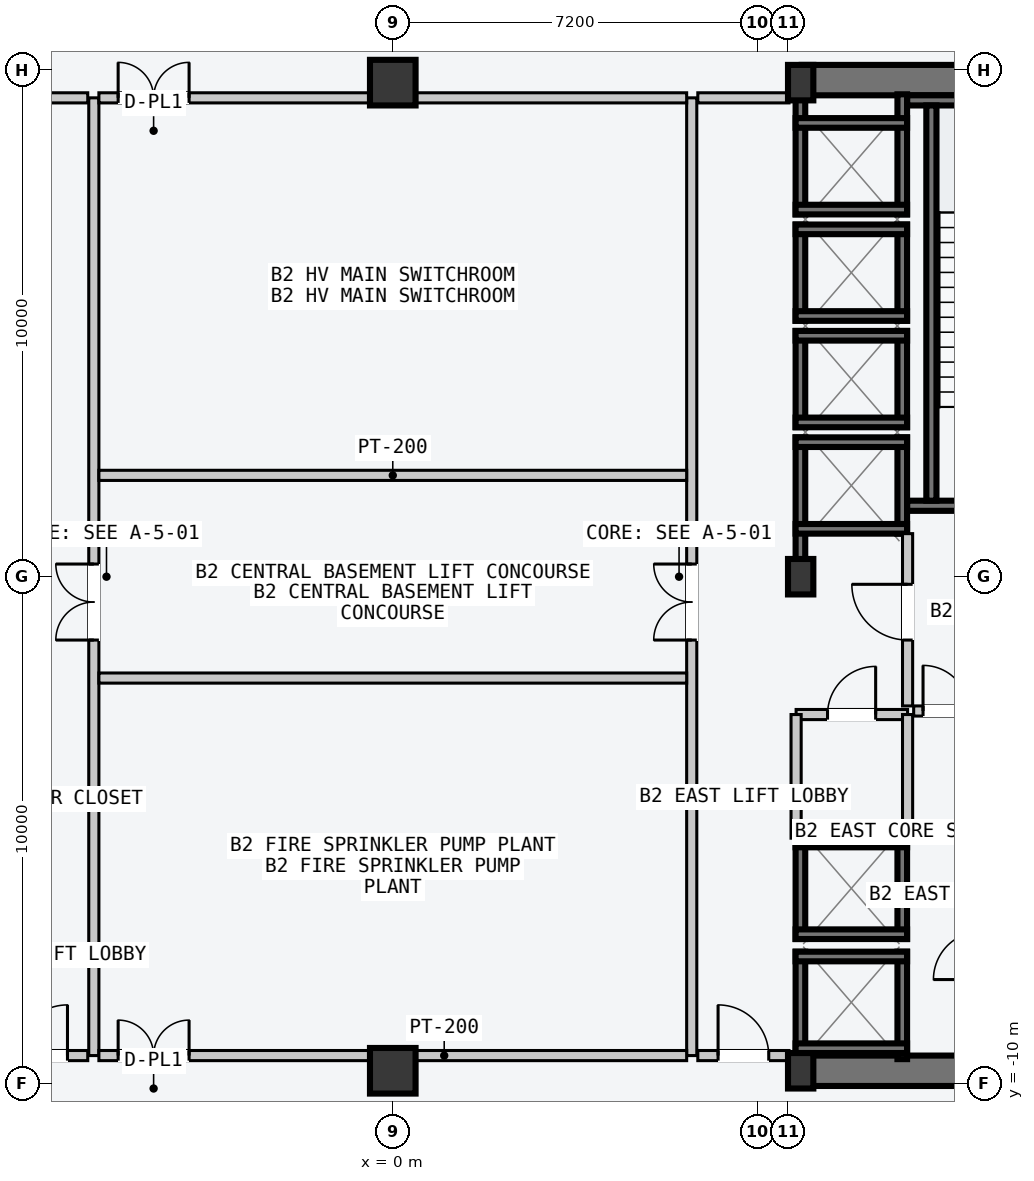
"""IFC4 building model, lengths in metres.
Left out: names, types, materials, properties, quantities, classifications, styles, units other than length and angle.
Written with IfcOpenShell. Run it as: python <this file> out.ifc"""

import sys

from ifc_helpers import new_model, si_unit, direction, frame, frame_2d, origin, origin_2d, place, context, subcontext, project, spatial, rectangle, hollow_rectangle, i_section, extrude, element, fill, save


model = new_model("IFC4")
c1 = context("Model", 3, precision=1e-05, world=origin(), true_north=direction((0.0, 1.0)))
c2 = subcontext(c1, "Body", "Model", "MODEL_VIEW")
j1 = project(units=[si_unit("LENGTHUNIT", "METRE"), si_unit("PLANEANGLEUNIT", "RADIAN")], contexts=[c1])
p1 = place(None, origin())
s1 = spatial("IfcSite", under=j1, at=p1, CompositionType="ELEMENT")
p2 = place(p1, origin())
s2 = spatial("IfcBuilding", under=s1, at=p2, CompositionType="ELEMENT")
p3 = place(p2, frame((0.0, 0.0, -9.6)))
s3 = spatial("IfcBuildingStorey", under=s2, at=p3, CompositionType="ELEMENT", Elevation=-9.6)
for number, where, z_axis, x_axis in (
    (1, (8.07, -9.75, 0.0), (0.0, 0.0, 1.0), (1.0, 0.0, 0.0)),
    (2, (8.07, 9.8, 0.0), (0.0, 0.0, 1.0), (1.0, 0.0, 0.0)),
):
    element("IfcWall", number, at=place(p3, frame(where, z_axis=z_axis, x_axis=x_axis)), inside=s3, PredefinedType="SHEAR", context=c2, shape_type="SweptSolid", body=[
        extrude(rectangle(XDim=6.46, YDim=0.6, at=frame_2d((3.23, 0.0))), origin(), (0.0, 0.0, 1.0), 4.58),
    ])
p4 = place(p3, frame((10.15, 1.4, 0.0), z_axis=(0.0, 0.0, 1.0), x_axis=(1.0, 0.0, 0.0)))
e3 = element("IfcWall", 3, at=p4, inside=s3, PredefinedType="SOLIDWALL", context=c2, shape_type="SweptSolid", body=[
    extrude(rectangle(XDim=4.1, YDim=0.2, at=frame_2d((2.05, 0.0))), origin(), (0.0, 0.0, 1.0), 4.58),
])
p5 = place(p4, frame((1.5, 0.0, 0.0)))
e4 = element("IfcOpeningElement", 4, at=p5, cuts=e3, PredefinedType="OPENING", context=c2, shape_type="SweptSolid", body=[
    extrude(rectangle(XDim=1.12, YDim=2.18, at=frame_2d((0.56, 1.09))), frame((0.0, 0.11, 0.0), z_axis=(0.0, -1.0, 0.0), x_axis=(1.0, 0.0, 0.0)), (0.0, 0.0, 1.0), 0.22),
])
p6 = place(p3, frame((10.15, 9.4, 0.0), z_axis=(0.0, 0.0, 1.0), x_axis=(1.0, 0.0, 0.0)))
e5 = element("IfcWall", 5, at=p6, inside=s3, PredefinedType="SOLIDWALL", context=c2, shape_type="SweptSolid", body=[
    extrude(rectangle(XDim=4.1, YDim=0.2, at=frame_2d((2.05, 0.0))), origin(), (0.0, 0.0, 1.0), 4.58),
])
p7 = place(p3, frame((10.63, 1.5, 0.0), z_axis=(0.0, 0.0, 1.0), x_axis=(0.0, 1.0, 0.0)))
e6 = element("IfcWall", 6, at=p7, inside=s3, PredefinedType="SOLIDWALL", context=c2, shape_type="SweptSolid", body=[
    extrude(rectangle(XDim=7.8, YDim=0.2, at=frame_2d((3.9, 0.0))), origin(), (0.0, 0.0, 1.0), 4.58),
])
for number, where, z_axis, x_axis in (
    (7, (8.05, -9.75, 0.0), (0.0, 0.0, 1.0), (1.0, 0.0, 0.0)),
    (8, (8.05, 0.0, 0.0), (0.0, 0.0, 1.0), (1.0, 0.0, 0.0)),
    (9, (8.05, 9.75, 0.0), (0.0, 0.0, 1.0), (1.0, 0.0, 0.0)),
):
    element("IfcColumn", number, at=place(p3, frame(where, z_axis=z_axis, x_axis=x_axis)), inside=s3, PredefinedType="COLUMN", context=c2, shape_type="SweptSolid", body=[
        extrude(i_section(OverallWidth=0.5, OverallDepth=0.7, WebThickness=0.028, FlangeThickness=0.045, at=origin_2d()), origin(), (0.0, 0.0, 1.0), 4.8),
    ])
for number, where, z_axis, x_axis in (
    (10, (0.0, -9.75, 0.0), (0.0, 0.0, 1.0), (1.0, 0.0, 0.0)),
    (11, (0.0, 9.75, 0.0), (0.0, 0.0, 1.0), (1.0, 0.0, 0.0)),
):
    element("IfcColumn", number, at=place(p3, frame(where, z_axis=z_axis, x_axis=x_axis)), inside=s3, PredefinedType="COLUMN", context=c2, shape_type="SweptSolid", body=[
        extrude(hollow_rectangle(XDim=0.9, YDim=0.9, WallThickness=0.045, at=origin_2d()), origin(), (0.0, 0.0, 1.0), 4.8),
    ])
p8 = place(p3, frame((8.045, 0.21, 0.0), z_axis=(0.0, 0.0, 1.0), x_axis=(0.0, 1.0, 0.0)))
e12 = element("IfcWall", 12, at=p8, inside=s3, PredefinedType="SOLIDWALL", context=c2, shape_type="SweptSolid", body=[
    extrude(rectangle(XDim=2.54, YDim=0.19, at=frame_2d((1.27, 0.0))), origin(), (0.0, 0.0, 1.0), 4.58),
])
p9 = place(p3, frame((10.055, 0.85, 0.0), z_axis=(0.0, 0.0, 1.0), x_axis=(0.0, 1.0, 0.0)))
e13 = element("IfcWall", 13, at=p9, inside=s3, PredefinedType="SOLIDWALL", context=c2, shape_type="SweptSolid", body=[
    extrude(rectangle(XDim=1.9, YDim=0.19, at=frame_2d((0.95, 0.0))), origin(), (0.0, 0.0, 1.0), 4.58),
])
for number, where, z_axis, x_axis in (
    (14, (7.95, 2.655, 0.0), (0.0, 0.0, 1.0), (1.0, 0.0, 0.0)),
    (15, (7.95, 0.945, 0.0), (0.0, 0.0, 1.0), (1.0, 0.0, 0.0)),
):
    element("IfcWall", number, at=place(p3, frame(where, z_axis=z_axis, x_axis=x_axis)), inside=s3, PredefinedType="SOLIDWALL", context=c2, shape_type="SweptSolid", body=[
        extrude(rectangle(XDim=2.2, YDim=0.19, at=frame_2d((1.1, 0.0))), origin(), (0.0, 0.0, 1.0), 4.58),
    ])
for number, where, z_axis, x_axis in (
    (16, (8.045, 2.95, 0.0), (0.0, 0.0, 1.0), (0.0, 1.0, 0.0)),
    (17, (10.055, 2.95, 0.0), (0.0, 0.0, 1.0), (0.0, 1.0, 0.0)),
):
    element("IfcWall", number, at=place(p3, frame(where, z_axis=z_axis, x_axis=x_axis)), inside=s3, PredefinedType="SOLIDWALL", context=c2, shape_type="SweptSolid", body=[
        extrude(rectangle(XDim=1.9, YDim=0.19, at=frame_2d((0.95, 0.0))), origin(), (0.0, 0.0, 1.0), 4.58),
    ])
for number, where, z_axis, x_axis in (
    (18, (7.95, 4.755, 0.0), (0.0, 0.0, 1.0), (1.0, 0.0, 0.0)),
    (19, (7.95, 3.045, 0.0), (0.0, 0.0, 1.0), (1.0, 0.0, 0.0)),
):
    element("IfcWall", number, at=place(p3, frame(where, z_axis=z_axis, x_axis=x_axis)), inside=s3, PredefinedType="SOLIDWALL", context=c2, shape_type="SweptSolid", body=[
        extrude(rectangle(XDim=2.2, YDim=0.19, at=frame_2d((1.1, 0.0))), origin(), (0.0, 0.0, 1.0), 4.58),
    ])
for number, where, z_axis, x_axis in (
    (20, (8.045, 5.05, 0.0), (0.0, 0.0, 1.0), (0.0, 1.0, 0.0)),
    (21, (10.055, 5.05, 0.0), (0.0, 0.0, 1.0), (0.0, 1.0, 0.0)),
):
    element("IfcWall", number, at=place(p3, frame(where, z_axis=z_axis, x_axis=x_axis)), inside=s3, PredefinedType="SOLIDWALL", context=c2, shape_type="SweptSolid", body=[
        extrude(rectangle(XDim=1.9, YDim=0.19, at=frame_2d((0.95, 0.0))), origin(), (0.0, 0.0, 1.0), 4.58),
    ])
for number, where, z_axis, x_axis in (
    (22, (7.95, 6.855, 0.0), (0.0, 0.0, 1.0), (1.0, 0.0, 0.0)),
    (23, (7.95, 5.145, 0.0), (0.0, 0.0, 1.0), (1.0, 0.0, 0.0)),
):
    element("IfcWall", number, at=place(p3, frame(where, z_axis=z_axis, x_axis=x_axis)), inside=s3, PredefinedType="SOLIDWALL", context=c2, shape_type="SweptSolid", body=[
        extrude(rectangle(XDim=2.2, YDim=0.19, at=frame_2d((1.1, 0.0))), origin(), (0.0, 0.0, 1.0), 4.58),
    ])
for number, where, z_axis, x_axis in (
    (24, (8.045, 7.15, 0.0), (0.0, 0.0, 1.0), (0.0, 1.0, 0.0)),
    (25, (10.055, 7.15, 0.0), (0.0, 0.0, 1.0), (0.0, 1.0, 0.0)),
):
    element("IfcWall", number, at=place(p3, frame(where, z_axis=z_axis, x_axis=x_axis)), inside=s3, PredefinedType="SOLIDWALL", context=c2, shape_type="SweptSolid", body=[
        extrude(rectangle(XDim=2.37, YDim=0.19, at=frame_2d((1.185, 0.0))), origin(), (0.0, 0.0, 1.0), 4.58),
    ])
for number, where, z_axis, x_axis in (
    (26, (7.95, 8.955, 0.0), (0.0, 0.0, 1.0), (1.0, 0.0, 0.0)),
    (27, (7.95, 7.245, 0.0), (0.0, 0.0, 1.0), (1.0, 0.0, 0.0)),
):
    element("IfcWall", number, at=place(p3, frame(where, z_axis=z_axis, x_axis=x_axis)), inside=s3, PredefinedType="SOLIDWALL", context=c2, shape_type="SweptSolid", body=[
        extrude(rectangle(XDim=2.2, YDim=0.19, at=frame_2d((1.1, 0.0))), origin(), (0.0, 0.0, 1.0), 4.58),
    ])
for number, where, z_axis, x_axis in (
    (28, (8.045, -9.52, 0.0), (0.0, 0.0, 1.0), (0.0, 1.0, 0.0)),
    (29, (10.055, -9.52, 0.0), (0.0, 0.0, 1.0), (0.0, 1.0, 0.0)),
):
    element("IfcWall", number, at=place(p3, frame(where, z_axis=z_axis, x_axis=x_axis)), inside=s3, PredefinedType="SOLIDWALL", context=c2, shape_type="SweptSolid", body=[
        extrude(rectangle(XDim=2.12, YDim=0.19, at=frame_2d((1.06, 0.0))), origin(), (0.0, 0.0, 1.0), 4.58),
    ])
for number, where, z_axis, x_axis in (
    (30, (7.95, -7.495, 0.0), (0.0, 0.0, 1.0), (1.0, 0.0, 0.0)),
    (31, (7.95, -9.305, 0.0), (0.0, 0.0, 1.0), (1.0, 0.0, 0.0)),
):
    element("IfcWall", number, at=place(p3, frame(where, z_axis=z_axis, x_axis=x_axis)), inside=s3, PredefinedType="SOLIDWALL", context=c2, shape_type="SweptSolid", body=[
        extrude(rectangle(XDim=2.2, YDim=0.19, at=frame_2d((1.1, 0.0))), origin(), (0.0, 0.0, 1.0), 4.58),
    ])
for number, where, z_axis, x_axis in (
    (32, (8.045, -7.15, 0.0), (0.0, 0.0, 1.0), (0.0, 1.0, 0.0)),
    (33, (10.055, -7.15, 0.0), (0.0, 0.0, 1.0), (0.0, 1.0, 0.0)),
):
    element("IfcWall", number, at=place(p3, frame(where, z_axis=z_axis, x_axis=x_axis)), inside=s3, PredefinedType="SOLIDWALL", context=c2, shape_type="SweptSolid", body=[
        extrude(rectangle(XDim=2.0, YDim=0.19, at=frame_2d((1.0, 0.0))), origin(), (0.0, 0.0, 1.0), 4.58),
    ])
for number, where, z_axis, x_axis in (
    (34, (7.95, -5.245, 0.0), (0.0, 0.0, 1.0), (1.0, 0.0, 0.0)),
    (35, (7.95, -7.055, 0.0), (0.0, 0.0, 1.0), (1.0, 0.0, 0.0)),
):
    element("IfcWall", number, at=place(p3, frame(where, z_axis=z_axis, x_axis=x_axis)), inside=s3, PredefinedType="SOLIDWALL", context=c2, shape_type="SweptSolid", body=[
        extrude(rectangle(XDim=2.2, YDim=0.19, at=frame_2d((1.1, 0.0))), origin(), (0.0, 0.0, 1.0), 4.58),
    ])
p10 = place(p3, frame((-5.9, -9.45, 0.0), z_axis=(0.0, 0.0, 1.0), x_axis=(0.0, 1.0, 0.0)))
e36 = element("IfcWall", 36, at=p10, inside=s3, PredefinedType="PARTITIONING", context=c2, shape_type="SweptSolid", body=[
    extrude(rectangle(XDim=18.9, YDim=0.2, at=frame_2d((9.45, 0.0))), origin(), (0.0, 0.0, 1.0), 4.58),
])
p11 = place(p10, frame((8.2, 0.0, 0.0)))
e37 = element("IfcOpeningElement", 37, at=p11, cuts=e36, PredefinedType="OPENING", context=c2, shape_type="SweptSolid", body=[
    extrude(rectangle(XDim=1.5, YDim=2.2, at=frame_2d((0.75, 1.1))), frame((0.0, 0.11, 0.0), z_axis=(0.0, -1.0, 0.0), x_axis=(1.0, 0.0, 0.0)), (0.0, 0.0, 1.0), 0.22),
])
p12 = place(p3, frame((-6.02, 9.45, 0.0), z_axis=(0.0, 0.0, 1.0), x_axis=(-1.0, 0.0, 0.0)))
e38 = element("IfcWall", 38, at=p12, inside=s3, PredefinedType="PARTITIONING", context=c2, shape_type="SweptSolid", body=[
    extrude(rectangle(XDim=1.8, YDim=0.2, at=frame_2d((0.9, 0.0))), origin(), (0.0, 0.0, 1.0), 4.58),
])
p13 = place(p3, frame((5.9, -9.45, 0.0), z_axis=(0.0, 0.0, 1.0), x_axis=(0.0, 1.0, 0.0)))
e39 = element("IfcWall", 39, at=p13, inside=s3, PredefinedType="PARTITIONING", context=c2, shape_type="SweptSolid", body=[
    extrude(rectangle(XDim=18.9, YDim=0.2, at=frame_2d((9.45, 0.0))), origin(), (0.0, 0.0, 1.0), 4.58),
])
p14 = place(p13, frame((8.2, 0.0, 0.0)))
e40 = element("IfcOpeningElement", 40, at=p14, cuts=e39, PredefinedType="OPENING", context=c2, shape_type="SweptSolid", body=[
    extrude(rectangle(XDim=1.5, YDim=2.2, at=frame_2d((0.75, 1.1))), frame((0.0, 0.11, 0.0), z_axis=(0.0, -1.0, 0.0), x_axis=(1.0, 0.0, 0.0)), (0.0, 0.0, 1.0), 0.22),
])
p15 = place(p3, frame((6.02, 9.45, 0.0), z_axis=(0.0, 0.0, 1.0), x_axis=(1.0, 0.0, 0.0)))
e41 = element("IfcWall", 41, at=p15, inside=s3, PredefinedType="PARTITIONING", context=c2, shape_type="SweptSolid", body=[
    extrude(rectangle(XDim=1.8, YDim=0.2, at=frame_2d((0.9, 0.0))), origin(), (0.0, 0.0, 1.0), 4.58),
])
p16 = place(p3, frame((10.16, -2.55, 0.0), z_axis=(0.0, 0.0, 1.0), x_axis=(0.0, 1.0, 0.0)))
e42 = element("IfcWall", 42, at=p16, inside=s3, PredefinedType="PARTITIONING", context=c2, shape_type="SweptSolid", body=[
    extrude(rectangle(XDim=3.4, YDim=0.2, at=frame_2d((1.7, 0.0))), origin(), (0.0, 0.0, 1.0), 4.58),
])
p17 = place(p16, frame((1.3, 0.0, 0.0)))
e43 = element("IfcOpeningElement", 43, at=p17, cuts=e42, PredefinedType="OPENING", context=c2, shape_type="SweptSolid", body=[
    extrude(rectangle(XDim=1.1, YDim=2.15, at=frame_2d((0.55, 1.075))), frame((0.0, 0.11, 0.0), z_axis=(0.0, -1.0, 0.0), x_axis=(1.0, 0.0, 0.0)), (0.0, 0.0, 1.0), 0.22),
])
p18 = place(p3, frame((10.28, -2.65, 0.0), z_axis=(0.0, 0.0, 1.0), x_axis=(1.0, 0.0, 0.0)))
e44 = element("IfcWall", 44, at=p18, inside=s3, PredefinedType="PARTITIONING", context=c2, shape_type="SweptSolid", body=[
    extrude(rectangle(XDim=1.27, YDim=0.2, at=frame_2d((0.635, 0.0))), origin(), (0.0, 0.0, 1.0), 4.58),
])
p19 = place(p18, frame((0.185, 0.0, 0.0)))
e45 = element("IfcOpeningElement", 45, at=p19, cuts=e44, PredefinedType="OPENING", context=c2, shape_type="SweptSolid", body=[
    extrude(rectangle(XDim=0.9, YDim=2.15, at=frame_2d((0.45, 1.075))), frame((0.0, 0.11, 0.0), z_axis=(0.0, -1.0, 0.0), x_axis=(1.0, 0.0, 0.0)), (0.0, 0.0, 1.0), 0.22),
])
p20 = place(p3, frame((7.96, -2.72, 0.0), z_axis=(0.0, 0.0, 1.0), x_axis=(1.0, 0.0, 0.0)))
e46 = element("IfcWall", 46, at=p20, inside=s3, PredefinedType="PARTITIONING", context=c2, shape_type="SweptSolid", body=[
    extrude(rectangle(XDim=2.2, YDim=0.2, at=frame_2d((1.1, 0.0))), origin(), (0.0, 0.0, 1.0), 4.58),
])
p21 = place(p20, frame((0.62, 0.0, 0.0)))
e47 = element("IfcOpeningElement", 47, at=p21, cuts=e46, PredefinedType="OPENING", context=c2, shape_type="SweptSolid", body=[
    extrude(rectangle(XDim=0.95, YDim=2.1, at=frame_2d((0.475, 1.05))), frame((0.0, 0.11, 0.0), z_axis=(0.0, -1.0, 0.0), x_axis=(1.0, 0.0, 0.0)), (0.0, 0.0, 1.0), 0.22),
])
for number, where, z_axis, x_axis in (
    (48, (7.96, -5.16, 0.0), (0.0, 0.0, 1.0), (0.0, 1.0, 0.0)),
    (49, (10.16, -5.16, 0.0), (0.0, 0.0, 1.0), (0.0, 1.0, 0.0)),
):
    element("IfcWall", number, at=place(p3, frame(where, z_axis=z_axis, x_axis=x_axis)), inside=s3, PredefinedType="PARTITIONING", context=c2, shape_type="SweptSolid", body=[
        extrude(rectangle(XDim=2.44, YDim=0.2, at=frame_2d((1.22, 0.0))), origin(), (0.0, 0.0, 1.0), 4.58),
    ])
p22 = place(p3, frame((-7.82, -9.45, 0.0), z_axis=(0.0, 0.0, 1.0), x_axis=(1.0, 0.0, 0.0)))
e50 = element("IfcWall", 50, at=p22, inside=s3, PredefinedType="PARTITIONING", context=c2, shape_type="SweptSolid", body=[
    extrude(rectangle(XDim=1.8, YDim=0.2, at=frame_2d((0.9, 0.0))), origin(), (0.0, 0.0, 1.0), 4.58),
])
p23 = place(p22, frame((0.4, 0.0, 0.0)))
e51 = element("IfcOpeningElement", 51, at=p23, cuts=e50, PredefinedType="OPENING", context=c2, shape_type="SweptSolid", body=[
    extrude(rectangle(XDim=1.0, YDim=2.15, at=frame_2d((0.5, 1.075))), frame((0.0, 0.11, 0.0), z_axis=(0.0, -1.0, 0.0), x_axis=(1.0, 0.0, 0.0)), (0.0, 0.0, 1.0), 0.22),
])
p24 = place(p3, frame((6.02, -9.45, 0.0), z_axis=(0.0, 0.0, 1.0), x_axis=(1.0, 0.0, 0.0)))
e52 = element("IfcWall", 52, at=p24, inside=s3, PredefinedType="PARTITIONING", context=c2, shape_type="SweptSolid", body=[
    extrude(rectangle(XDim=1.8, YDim=0.2, at=frame_2d((0.9, 0.0))), origin(), (0.0, 0.0, 1.0), 4.58),
])
p25 = place(p24, frame((0.4, 0.0, 0.0)))
e53 = element("IfcOpeningElement", 53, at=p25, cuts=e52, PredefinedType="OPENING", context=c2, shape_type="SweptSolid", body=[
    extrude(rectangle(XDim=1.0, YDim=2.15, at=frame_2d((0.5, 1.075))), frame((0.0, 0.11, 0.0), z_axis=(0.0, -1.0, 0.0), x_axis=(1.0, 0.0, 0.0)), (0.0, 0.0, 1.0), 0.22),
])
p26 = place(p3, frame((-5.8, -9.45, 0.0), z_axis=(0.0, 0.0, 1.0), x_axis=(1.0, 0.0, 0.0)))
e54 = element("IfcWall", 54, at=p26, inside=s3, PredefinedType="PARTITIONING", context=c2, shape_type="SweptSolid", body=[
    extrude(rectangle(XDim=11.6, YDim=0.2, at=frame_2d((5.8, 0.0))), origin(), (0.0, 0.0, 1.0), 4.58),
])
p27 = place(p26, frame((0.38, 0.0, 0.0)))
e55 = element("IfcOpeningElement", 55, at=p27, cuts=e54, PredefinedType="OPENING", context=c2, shape_type="SweptSolid", body=[
    extrude(rectangle(XDim=1.4, YDim=2.25, at=frame_2d((0.7, 1.125))), frame((0.0, 0.11, 0.0), z_axis=(0.0, -1.0, 0.0), x_axis=(1.0, 0.0, 0.0)), (0.0, 0.0, 1.0), 0.22),
])
for number, where, z_axis, x_axis in (
    (56, (-5.8, -2.0, 0.0), (0.0, 0.0, 1.0), (1.0, 0.0, 0.0)),
    (57, (-5.8, 2.0, 0.0), (0.0, 0.0, 1.0), (1.0, 0.0, 0.0)),
):
    element("IfcWall", number, at=place(p3, frame(where, z_axis=z_axis, x_axis=x_axis)), inside=s3, PredefinedType="PARTITIONING", context=c2, shape_type="SweptSolid", body=[
        extrude(rectangle(XDim=11.6, YDim=0.2, at=frame_2d((5.8, 0.0))), origin(), (0.0, 0.0, 1.0), 4.58),
    ])
p28 = place(p3, frame((-5.8, 9.45, 0.0), z_axis=(0.0, 0.0, 1.0), x_axis=(1.0, 0.0, 0.0)))
e58 = element("IfcWall", 58, at=p28, inside=s3, PredefinedType="PARTITIONING", context=c2, shape_type="SweptSolid", body=[
    extrude(rectangle(XDim=11.6, YDim=0.2, at=frame_2d((5.8, 0.0))), origin(), (0.0, 0.0, 1.0), 4.58),
])
p29 = place(p28, frame((0.38, 0.0, 0.0)))
e59 = element("IfcOpeningElement", 59, at=p29, cuts=e58, PredefinedType="OPENING", context=c2, shape_type="SweptSolid", body=[
    extrude(rectangle(XDim=1.4, YDim=2.25, at=frame_2d((0.7, 1.125))), frame((0.0, 0.11, 0.0), z_axis=(0.0, -1.0, 0.0), x_axis=(1.0, 0.0, 0.0)), (0.0, 0.0, 1.0), 0.22),
])
p30 = place(p11, origin())
e60 = element("IfcDoor", 60, at=p30, inside=s3, OperationType="DOUBLE_DOOR_SINGLE_SWING", PredefinedType="DOOR", context=c2, shape_type="SweptSolid", body=[
    extrude(rectangle(XDim=1.5, YDim=2.2, at=frame_2d((0.75, 1.1))), frame((0.0, 0.025, 0.0), z_axis=(0.0, -1.0, 0.0), x_axis=(1.0, 0.0, 0.0)), (0.0, 0.0, 1.0), 0.05),
])
fill(e37, e60)
p31 = place(p14, origin())
e61 = element("IfcDoor", 61, at=p31, inside=s3, OperationType="DOUBLE_DOOR_SINGLE_SWING", PredefinedType="DOOR", context=c2, shape_type="SweptSolid", body=[
    extrude(rectangle(XDim=1.5, YDim=2.2, at=frame_2d((0.75, 1.1))), frame((0.0, 0.025, 0.0), z_axis=(0.0, -1.0, 0.0), x_axis=(1.0, 0.0, 0.0)), (0.0, 0.0, 1.0), 0.05),
])
fill(e40, e61)
p32 = place(p17, origin())
e62 = element("IfcDoor", 62, at=p32, inside=s3, OperationType="SINGLE_SWING_RIGHT", PredefinedType="DOOR", context=c2, shape_type="SweptSolid", body=[
    extrude(rectangle(XDim=1.1, YDim=2.15, at=frame_2d((0.55, 1.075))), frame((0.0, 0.025, 0.0), z_axis=(0.0, -1.0, 0.0), x_axis=(1.0, 0.0, 0.0)), (0.0, 0.0, 1.0), 0.05),
])
fill(e43, e62)
p33 = place(p19, origin())
e63 = element("IfcDoor", 63, at=p33, inside=s3, OperationType="SINGLE_SWING_LEFT", PredefinedType="DOOR", context=c2, shape_type="SweptSolid", body=[
    extrude(rectangle(XDim=0.9, YDim=2.15, at=frame_2d((0.45, 1.075))), frame((0.0, 0.025, 0.0), z_axis=(0.0, -1.0, 0.0), x_axis=(1.0, 0.0, 0.0)), (0.0, 0.0, 1.0), 0.05),
])
fill(e45, e63)
p34 = place(p21, origin())
e64 = element("IfcDoor", 64, at=p34, inside=s3, OperationType="SINGLE_SWING_RIGHT", PredefinedType="DOOR", context=c2, shape_type="SweptSolid", body=[
    extrude(rectangle(XDim=0.95, YDim=2.1, at=frame_2d((0.475, 1.05))), frame((0.0, 0.025, 0.0), z_axis=(0.0, -1.0, 0.0), x_axis=(1.0, 0.0, 0.0)), (0.0, 0.0, 1.0), 0.05),
])
fill(e47, e64)
p35 = place(p23, origin())
e65 = element("IfcDoor", 65, at=p35, inside=s3, OperationType="SINGLE_SWING_RIGHT", PredefinedType="DOOR", context=c2, shape_type="SweptSolid", body=[
    extrude(rectangle(XDim=1.0, YDim=2.15, at=frame_2d((0.5, 1.075))), frame((0.0, 0.025, 0.0), z_axis=(0.0, -1.0, 0.0), x_axis=(1.0, 0.0, 0.0)), (0.0, 0.0, 1.0), 0.05),
])
fill(e51, e65)
p36 = place(p25, origin())
e66 = element("IfcDoor", 66, at=p36, inside=s3, OperationType="SINGLE_SWING_LEFT", PredefinedType="DOOR", context=c2, shape_type="SweptSolid", body=[
    extrude(rectangle(XDim=1.0, YDim=2.15, at=frame_2d((0.5, 1.075))), frame((0.0, 0.025, 0.0), z_axis=(0.0, -1.0, 0.0), x_axis=(1.0, 0.0, 0.0)), (0.0, 0.0, 1.0), 0.05),
])
fill(e53, e66)
p37 = place(p27, origin())
e67 = element("IfcDoor", 67, at=p37, inside=s3, OperationType="DOUBLE_DOOR_SINGLE_SWING", PredefinedType="DOOR", context=c2, shape_type="SweptSolid", body=[
    extrude(rectangle(XDim=1.4, YDim=2.25, at=frame_2d((0.7, 1.125))), frame((0.0, 0.025, 0.0), z_axis=(0.0, -1.0, 0.0), x_axis=(1.0, 0.0, 0.0)), (0.0, 0.0, 1.0), 0.05),
])
fill(e55, e67)
p38 = place(p29, origin())
e68 = element("IfcDoor", 68, at=p38, inside=s3, OperationType="DOUBLE_DOOR_SINGLE_SWING", PredefinedType="DOOR", context=c2, shape_type="SweptSolid", body=[
    extrude(rectangle(XDim=1.4, YDim=2.25, at=frame_2d((0.7, 1.125))), frame((0.0, 0.025, 0.0), z_axis=(0.0, -1.0, 0.0), x_axis=(1.0, 0.0, 0.0)), (0.0, 0.0, 1.0), 0.05),
])
fill(e59, e68)
save(model, sys.argv[1])
